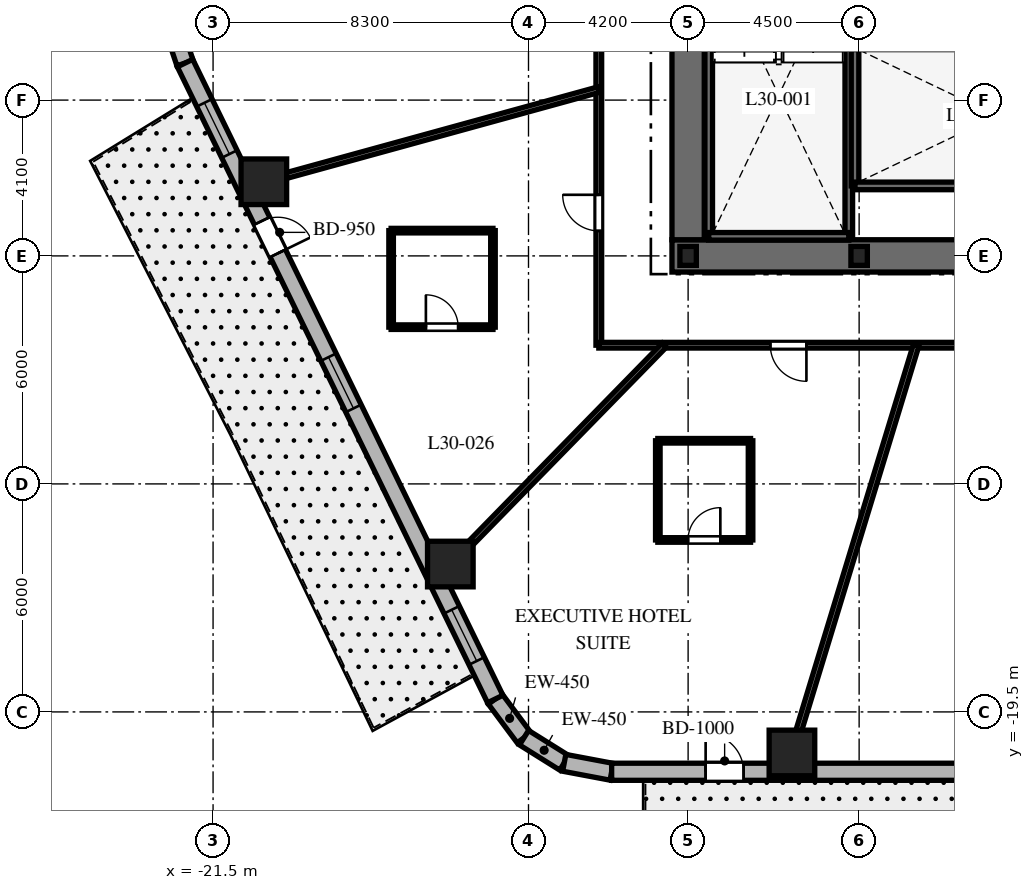
"""IFC4 building model, lengths in metres.
Left out: names, types, materials, properties, quantities, classifications, styles, units other than length and angle.
Written with IfcOpenShell. Run it as: python <this file> out.ifc"""

import sys

from ifc_helpers import new_model, si_unit, direction, frame, frame_2d, origin, origin_2d, place, context, subcontext, project, spatial, rectangle, i_section, extrude, element, fill, save


model = new_model("IFC4")
c1 = context("Model", 3, precision=1e-05, world=origin(), true_north=direction((0.0, 1.0)))
c2 = subcontext(c1, "Body", "Model", "MODEL_VIEW")
j1 = project(units=[si_unit("LENGTHUNIT", "METRE"), si_unit("PLANEANGLEUNIT", "RADIAN")], contexts=[c1])
p1 = place(None, origin())
s1 = spatial("IfcSite", under=j1, at=p1, CompositionType="ELEMENT")
p2 = place(p1, origin())
s2 = spatial("IfcBuilding", under=s1, at=p2, CompositionType="ELEMENT")
p3 = place(p2, frame((0.0, 0.0, 124.7)))
s3 = spatial("IfcBuildingStorey", under=s2, at=p3, CompositionType="ELEMENT", Elevation=124.7)
p4 = place(p3, frame((-9.425, -7.5, 0.0), z_axis=(0.0, 0.0, 1.0), x_axis=(1.0, 0.0, 0.0)))
e1 = element("IfcWall", 1, at=p4, inside=s3, PredefinedType="SHEAR", context=c2, shape_type="SweptSolid", body=[
    extrude(rectangle(XDim=18.85, YDim=0.85, at=frame_2d((9.425, 0.0))), origin(), (0.0, 0.0, 1.0), 3.7),
])
p5 = place(p4, frame((9.475, 0.0, 0.0)))
e2 = element("IfcOpeningElement", 2, at=p5, cuts=e1, PredefinedType="OPENING", context=c2, shape_type="SweptSolid", body=[
    extrude(rectangle(XDim=1.0, YDim=2.15, at=frame_2d((0.5, 1.075))), frame((0.0, 0.435, 0.0), z_axis=(0.0, -1.0, 0.0), x_axis=(1.0, 0.0, 0.0)), (0.0, 0.0, 1.0), 0.87),
])
p6 = place(p3, frame((-9.0, -7.075, 0.0), z_axis=(0.0, 0.0, 1.0), x_axis=(0.0, 1.0, 0.0)))
e3 = element("IfcWall", 3, at=p6, inside=s3, PredefinedType="SHEAR", context=c2, shape_type="SweptSolid", body=[
    extrude(rectangle(XDim=14.15, YDim=0.85, at=frame_2d((7.075, 0.0))), origin(), (0.0, 0.0, 1.0), 3.7),
])
p7 = place(p6, frame((10.2, 0.0, 0.0)))
e4 = element("IfcOpeningElement", 4, at=p7, cuts=e3, PredefinedType="OPENING", context=c2, shape_type="SweptSolid", body=[
    extrude(rectangle(XDim=1.05, YDim=2.15, at=frame_2d((0.525, 1.075))), frame((0.0, 0.435, 0.0), z_axis=(0.0, -1.0, 0.0), x_axis=(1.0, 0.0, 0.0)), (0.0, 0.0, 1.0), 0.87),
])
for number, where, z_axis, x_axis in (
    (5, (-8.458, -6.985, 0.0), (0.0, 0.0, 1.0), (0.0, 1.0, 0.0)),
    (6, (-4.772, -6.985, 0.0), (0.0, 0.0, 1.0), (0.0, 1.0, 0.0)),
):
    element("IfcWall", number, at=place(p3, frame(where, z_axis=z_axis, x_axis=x_axis)), inside=s3, PredefinedType="SHEAR", context=c2, shape_type="SweptSolid", body=[
        extrude(rectangle(XDim=9.143, YDim=0.2, at=frame_2d((4.572, 0.0))), origin(), (0.0, 0.0, 1.0), 3.7),
    ])
for number, where, z_axis, x_axis in (
    (7, (-8.458, -6.985, 0.0), (0.0, 0.0, 1.0), (1.0, 0.0, 0.0)),
    (8, (-4.608, -5.658, 0.0), (0.0, 0.0, 1.0), (0.0, 1.0, 0.0)),
):
    element("IfcWall", number, at=place(p3, frame(where, z_axis=z_axis, x_axis=x_axis)), inside=s3, PredefinedType="SHEAR", context=c2, shape_type="SweptSolid", body=[
        extrude(rectangle(XDim=3.686, YDim=0.2, at=frame_2d((1.843, 0.0))), origin(), (0.0, 0.0, 1.0), 3.7),
    ])
p8 = place(p3, frame((-4.608, -5.658, 0.0), z_axis=(0.0, 0.0, 1.0), x_axis=(1.0, 0.0, 0.0)))
e9 = element("IfcWall", 9, at=p8, inside=s3, PredefinedType="SHEAR", context=c2, shape_type="SweptSolid", body=[
    extrude(rectangle(XDim=9.166, YDim=0.2, at=frame_2d((4.583, 0.0))), origin(), (0.0, 0.0, 1.0), 3.7),
])
p9 = place(p8, frame((7.45, 0.0, 0.0)))
e10 = element("IfcOpeningElement", 10, at=p9, cuts=e9, PredefinedType="OPENING", context=c2, shape_type="SweptSolid", body=[
    extrude(rectangle(XDim=1.0, YDim=2.15, at=frame_2d((0.5, 1.075))), frame((0.0, 0.11, 0.0), z_axis=(0.0, -1.0, 0.0), x_axis=(1.0, 0.0, 0.0)), (0.0, 0.0, 1.0), 0.22),
])
for number, where, z_axis, x_axis in (
    (11, (-9.0, -7.5, 0.0), (0.0, 0.0, 1.0), (1.0, 0.0, 0.0)),
    (12, (-4.5, -7.5, 0.0), (0.0, 0.0, 1.0), (1.0, 0.0, 0.0)),
):
    element("IfcColumn", number, at=place(p3, frame(where, z_axis=z_axis, x_axis=x_axis)), inside=s3, PredefinedType="COLUMN", context=c2, shape_type="SweptSolid", body=[
        extrude(i_section(OverallWidth=0.432, OverallDepth=0.498, WebThickness=0.056, FlangeThickness=0.089, at=origin_2d()), origin(), (0.0, 0.0, 1.0), 3.7),
    ])
for number, where, z_axis, x_axis in (
    (13, (-6.268, -20.58, 0.0), (0.0, 0.0, 1.0), (1.0, 0.0, 0.0)),
    (14, (-20.164, -5.549, 0.0), (0.0, 0.0, 1.0), (1.0, 0.0, 0.0)),
    (15, (-15.257, -15.609, 0.0), (0.0, 0.0, 1.0), (1.0, 0.0, 0.0)),
):
    element("IfcColumn", number, at=place(p3, frame(where, z_axis=z_axis, x_axis=x_axis)), inside=s3, PredefinedType="COLUMN", context=c2, shape_type="SweptSolid", body=[
        extrude(rectangle(XDim=1.2, YDim=1.2, at=origin_2d()), origin(), (0.0, 0.0, 1.0), 3.7),
    ])
p10 = place(p3, frame((-14.076, -19.161, 0.0), z_axis=(0.0, 0.0, 1.0), x_axis=(0.597226657159, -0.802072515412, 0.0)))
e16 = element("IfcWall", 16, at=p10, inside=s3, PredefinedType="SOLIDWALL", context=c2, shape_type="SweptSolid", body=[
    extrude(rectangle(XDim=1.269, YDim=0.45, at=frame_2d((0.635, 0.0))), origin(), (0.0, 0.0, 1.0), 3.4),
])
p11 = place(p3, frame((-13.318, -20.179, 0.0), z_axis=(0.0, 0.0, 1.0), x_axis=(0.848031272749, -0.529946186362, 0.0)))
e17 = element("IfcWall", 17, at=p11, inside=s3, PredefinedType="SOLIDWALL", context=c2, shape_type="SweptSolid", body=[
    extrude(rectangle(XDim=1.248, YDim=0.45, at=frame_2d((0.624, 0.0))), origin(), (0.0, 0.0, 1.0), 3.4),
])
p12 = place(p3, frame((-12.259, -20.84, 0.0), z_axis=(0.0, 0.0, 1.0), x_axis=(0.982730354425, -0.185043374624, 0.0)))
e18 = element("IfcWall", 18, at=p12, inside=s3, PredefinedType="SOLIDWALL", context=c2, shape_type="SweptSolid", body=[
    extrude(rectangle(XDim=1.269, YDim=0.45, at=frame_2d((0.635, 0.0))), origin(), (0.0, 0.0, 1.0), 3.4),
])
p13 = place(p3, frame((-22.522, -1.577, 0.0), z_axis=(0.0, 0.0, 1.0), x_axis=(0.317372694837, -0.948300887151, 0.0)))
e19 = element("IfcWall", 19, at=p13, inside=s3, PredefinedType="SOLIDWALL", context=c2, shape_type="SweptSolid", body=[
    extrude(rectangle(XDim=0.896, YDim=0.45, at=frame_2d((0.448, 0.0))), origin(), (0.0, 0.0, 1.0), 3.4),
])
p14 = place(p3, frame((-11.012, -21.075, 0.0), z_axis=(0.0, 0.0, 1.0), x_axis=(1.0, 0.0, 0.0)))
e20 = element("IfcWall", 20, at=p14, inside=s3, PredefinedType="SOLIDWALL", context=c2, shape_type="SweptSolid", body=[
    extrude(rectangle(XDim=23.782, YDim=0.45, at=frame_2d((11.891, 0.0))), origin(), (0.0, 0.0, 1.0), 3.4),
])
p15 = place(p14, frame((2.473, 0.0, 0.0)))
e21 = element("IfcOpeningElement", 21, at=p15, cuts=e20, PredefinedType="OPENING", context=c2, shape_type="SweptSolid", body=[
    extrude(rectangle(XDim=1.0, YDim=2.15, at=frame_2d((0.5, 1.075))), frame((0.0, 0.235, 0.0), z_axis=(0.0, -1.0, 0.0), x_axis=(1.0, 0.0, 0.0)), (0.0, 0.0, 1.0), 0.47),
])
p16 = place(p14, frame((11.142, 0.0, 0.8)))
e22 = element("IfcOpeningElement", 22, at=p16, cuts=e20, PredefinedType="OPENING", context=c2, shape_type="SweptSolid", body=[
    extrude(rectangle(XDim=1.5, YDim=1.8, at=frame_2d((0.75, 0.9))), frame((0.0, 0.235, 0.0), z_axis=(0.0, -1.0, 0.0), x_axis=(1.0, 0.0, 0.0)), (0.0, 0.0, 1.0), 0.47),
])
p17 = place(p14, frame((20.741, 0.0, 0.8)))
e23 = element("IfcOpeningElement", 23, at=p17, cuts=e20, PredefinedType="OPENING", context=c2, shape_type="SweptSolid", body=[
    extrude(rectangle(XDim=1.5, YDim=1.8, at=frame_2d((0.75, 0.9))), frame((0.0, 0.235, 0.0), z_axis=(0.0, -1.0, 0.0), x_axis=(1.0, 0.0, 0.0)), (0.0, 0.0, 1.0), 0.47),
])
p18 = place(p3, frame((-22.238, -2.427, 0.0), z_axis=(0.0, 0.0, 1.0), x_axis=(0.438374803278, -0.898792262901, 0.0)))
e24 = element("IfcWall", 24, at=p18, inside=s3, PredefinedType="SOLIDWALL", context=c2, shape_type="SweptSolid", body=[
    extrude(rectangle(XDim=18.618, YDim=0.45, at=frame_2d((9.309, 0.0))), origin(), (0.0, 0.0, 1.0), 3.4),
])
p19 = place(p18, frame((4.62, 0.0, 0.0)))
e25 = element("IfcOpeningElement", 25, at=p19, cuts=e24, PredefinedType="OPENING", context=c2, shape_type="SweptSolid", body=[
    extrude(rectangle(XDim=0.95, YDim=2.15, at=frame_2d((0.475, 1.075))), frame((0.0, 0.235, 0.0), z_axis=(0.0, -1.0, 0.0), x_axis=(1.0, 0.0, 0.0)), (0.0, 0.0, 1.0), 0.47),
])
p20 = place(p18, frame((1.163, 0.0, 0.8)))
e26 = element("IfcOpeningElement", 26, at=p20, cuts=e24, PredefinedType="OPENING", context=c2, shape_type="SweptSolid", body=[
    extrude(rectangle(XDim=1.5, YDim=1.8, at=frame_2d((0.75, 0.9))), frame((0.0, 0.235, 0.0), z_axis=(0.0, -1.0, 0.0), x_axis=(1.0, 0.0, 0.0)), (0.0, 0.0, 1.0), 0.47),
])
p21 = place(p18, frame((8.61, 0.0, 0.8)))
e27 = element("IfcOpeningElement", 27, at=p21, cuts=e24, PredefinedType="OPENING", context=c2, shape_type="SweptSolid", body=[
    extrude(rectangle(XDim=1.5, YDim=1.8, at=frame_2d((0.75, 0.9))), frame((0.0, 0.235, 0.0), z_axis=(0.0, -1.0, 0.0), x_axis=(1.0, 0.0, 0.0)), (0.0, 0.0, 1.0), 0.47),
])
p22 = place(p18, frame((16.006, 0.0, 0.8)))
e28 = element("IfcOpeningElement", 28, at=p22, cuts=e24, PredefinedType="OPENING", context=c2, shape_type="SweptSolid", body=[
    extrude(rectangle(XDim=1.5, YDim=1.8, at=frame_2d((0.75, 0.9))), frame((0.0, 0.235, 0.0), z_axis=(0.0, -1.0, 0.0), x_axis=(1.0, 0.0, 0.0)), (0.0, 0.0, 1.0), 0.47),
])
p23 = place(p3, frame((-11.35, -9.85, 0.0), z_axis=(0.0, 0.0, 1.0), x_axis=(0.0, 1.0, 0.0)))
e29 = element("IfcWall", 29, at=p23, inside=s3, PredefinedType="PARTITIONING", context=c2, shape_type="SweptSolid", body=[
    extrude(rectangle(XDim=19.7, YDim=0.15, at=frame_2d((9.85, 0.0))), origin(), (0.0, 0.0, 1.0), 2.84),
])
p24 = place(p23, frame((15.205, 0.0, 0.0)))
e30 = element("IfcOpeningElement", 30, at=p24, cuts=e29, PredefinedType="OPENING", context=c2, shape_type="SweptSolid", body=[
    extrude(rectangle(XDim=0.95, YDim=2.03, at=frame_2d((0.475, 1.015))), frame((0.0, 0.085, 0.0), z_axis=(0.0, -1.0, 0.0), x_axis=(1.0, 0.0, 0.0)), (0.0, 0.0, 1.0), 0.17),
])
p25 = place(p23, frame((8.836, 0.0, 0.0)))
e31 = element("IfcOpeningElement", 31, at=p25, cuts=e29, PredefinedType="OPENING", context=c2, shape_type="SweptSolid", body=[
    extrude(rectangle(XDim=0.95, YDim=2.03, at=frame_2d((0.475, 1.015))), frame((0.0, 0.085, 0.0), z_axis=(0.0, -1.0, 0.0), x_axis=(1.0, 0.0, 0.0)), (0.0, 0.0, 1.0), 0.17),
])
p26 = place(p23, frame((3.008, 0.0, 0.0)))
e32 = element("IfcOpeningElement", 32, at=p26, cuts=e29, PredefinedType="OPENING", context=c2, shape_type="SweptSolid", body=[
    extrude(rectangle(XDim=0.95, YDim=2.03, at=frame_2d((0.475, 1.015))), frame((0.0, 0.085, 0.0), z_axis=(0.0, -1.0, 0.0), x_axis=(1.0, 0.0, 0.0)), (0.0, 0.0, 1.0), 0.17),
])
p27 = place(p3, frame((11.35, -9.85, 0.0), z_axis=(0.0, 0.0, 1.0), x_axis=(-1.0, 0.0, 0.0)))
e33 = element("IfcWall", 33, at=p27, inside=s3, PredefinedType="PARTITIONING", context=c2, shape_type="SweptSolid", body=[
    extrude(rectangle(XDim=22.7, YDim=0.15, at=frame_2d((11.35, 0.0))), origin(), (0.0, 0.0, 1.0), 2.84),
])
p28 = place(p27, frame((17.237, 0.0, 0.0)))
e34 = element("IfcOpeningElement", 34, at=p28, cuts=e33, PredefinedType="OPENING", context=c2, shape_type="SweptSolid", body=[
    extrude(rectangle(XDim=0.95, YDim=2.03, at=frame_2d((0.475, 1.015))), frame((0.0, 0.085, 0.0), z_axis=(0.0, -1.0, 0.0), x_axis=(1.0, 0.0, 0.0)), (0.0, 0.0, 1.0), 0.17),
])
p29 = place(p27, frame((10.45, 0.0, 0.0)))
e35 = element("IfcOpeningElement", 35, at=p29, cuts=e33, PredefinedType="OPENING", context=c2, shape_type="SweptSolid", body=[
    extrude(rectangle(XDim=0.95, YDim=2.03, at=frame_2d((0.475, 1.015))), frame((0.0, 0.085, 0.0), z_axis=(0.0, -1.0, 0.0), x_axis=(1.0, 0.0, 0.0)), (0.0, 0.0, 1.0), 0.17),
])
p30 = place(p27, frame((3.399, 0.0, 0.0)))
e36 = element("IfcOpeningElement", 36, at=p30, cuts=e33, PredefinedType="OPENING", context=c2, shape_type="SweptSolid", body=[
    extrude(rectangle(XDim=0.95, YDim=2.03, at=frame_2d((0.475, 1.015))), frame((0.0, 0.085, 0.0), z_axis=(0.0, -1.0, 0.0), x_axis=(1.0, 0.0, 0.0)), (0.0, 0.0, 1.0), 0.17),
])
p31 = place(p3, frame((-11.35, -3.123, 0.0), z_axis=(0.0, 0.0, 1.0), x_axis=(-0.964151983214, -0.265350623261, 0.0)))
e37 = element("IfcWall", 37, at=p31, inside=s3, PredefinedType="PARTITIONING", context=c2, shape_type="SweptSolid", body=[
    extrude(rectangle(XDim=9.645, YDim=0.15, at=frame_2d((4.823, 0.0))), origin(), (0.0, 0.0, 1.0), 2.54),
])
p32 = place(p3, frame((-9.628, -9.85, 0.0), z_axis=(0.0, 0.0, 1.0), x_axis=(-0.698992824326, -0.715128681805, 0.0)))
e38 = element("IfcWall", 38, at=p32, inside=s3, PredefinedType="PARTITIONING", context=c2, shape_type="SweptSolid", body=[
    extrude(rectangle(XDim=8.579, YDim=0.15, at=frame_2d((4.29, 0.0))), origin(), (0.0, 0.0, 1.0), 2.54),
])
p33 = place(p3, frame((-3.0, -9.85, 0.0), z_axis=(0.0, 0.0, 1.0), x_axis=(-0.291352035382, -0.95661590593, 0.0)))
e39 = element("IfcWall", 39, at=p33, inside=s3, PredefinedType="PARTITIONING", context=c2, shape_type="SweptSolid", body=[
    extrude(rectangle(XDim=11.734, YDim=0.15, at=frame_2d((5.867, 0.0))), origin(), (0.0, 0.0, 1.0), 2.54),
])
p34 = place(p3, frame((-16.815, -9.375, 0.0), z_axis=(0.0, 0.0, 1.0), x_axis=(1.0, 0.0, 0.0)))
e40 = element("IfcWall", 40, at=p34, inside=s3, PredefinedType="PARTITIONING", context=c2, shape_type="SweptSolid", body=[
    extrude(rectangle(XDim=2.68, YDim=0.12, at=frame_2d((1.34, 0.0))), origin(), (0.0, 0.0, 1.0), 2.927),
])
p35 = place(p34, frame((0.915, 0.0, 0.0)))
e41 = element("IfcOpeningElement", 41, at=p35, cuts=e40, PredefinedType="OPENING", context=c2, shape_type="SweptSolid", body=[
    extrude(rectangle(XDim=0.85, YDim=2.03, at=frame_2d((0.425, 1.015))), frame((0.0, 0.07, 0.0), z_axis=(0.0, -1.0, 0.0), x_axis=(1.0, 0.0, 0.0)), (0.0, 0.0, 1.0), 0.14),
])
p36 = place(p3, frame((-14.135, -9.375, 0.0), z_axis=(0.0, 0.0, 1.0), x_axis=(0.0, 1.0, 0.0)))
e42 = element("IfcWall", 42, at=p36, inside=s3, PredefinedType="PARTITIONING", context=c2, shape_type="SweptSolid", body=[
    extrude(rectangle(XDim=2.54, YDim=0.12, at=frame_2d((1.27, 0.0))), origin(), (0.0, 0.0, 1.0), 3.4),
])
p37 = place(p3, frame((-14.135, -6.835, 0.0), z_axis=(0.0, 0.0, 1.0), x_axis=(-1.0, 0.0, 0.0)))
e43 = element("IfcWall", 43, at=p37, inside=s3, PredefinedType="PARTITIONING", context=c2, shape_type="SweptSolid", body=[
    extrude(rectangle(XDim=2.68, YDim=0.12, at=frame_2d((1.34, 0.0))), origin(), (0.0, 0.0, 1.0), 2.927),
])
p38 = place(p3, frame((-16.815, -6.835, 0.0), z_axis=(0.0, 0.0, 1.0), x_axis=(0.0, -1.0, 0.0)))
e44 = element("IfcWall", 44, at=p38, inside=s3, PredefinedType="PARTITIONING", context=c2, shape_type="SweptSolid", body=[
    extrude(rectangle(XDim=2.54, YDim=0.12, at=frame_2d((1.27, 0.0))), origin(), (0.0, 0.0, 1.0), 3.4),
])
p39 = place(p3, frame((-9.797, -14.975, 0.0), z_axis=(0.0, 0.0, 1.0), x_axis=(1.0, 0.0, 0.0)))
e45 = element("IfcWall", 45, at=p39, inside=s3, PredefinedType="PARTITIONING", context=c2, shape_type="SweptSolid", body=[
    extrude(rectangle(XDim=2.44, YDim=0.12, at=frame_2d((1.22, 0.0))), origin(), (0.0, 0.0, 1.0), 2.972),
])
p40 = place(p39, frame((0.795, 0.0, 0.0)))
e46 = element("IfcOpeningElement", 46, at=p40, cuts=e45, PredefinedType="OPENING", context=c2, shape_type="SweptSolid", body=[
    extrude(rectangle(XDim=0.85, YDim=2.03, at=frame_2d((0.425, 1.015))), frame((0.0, 0.07, 0.0), z_axis=(0.0, -1.0, 0.0), x_axis=(1.0, 0.0, 0.0)), (0.0, 0.0, 1.0), 0.14),
])
p41 = place(p3, frame((-7.357, -14.975, 0.0), z_axis=(0.0, 0.0, 1.0), x_axis=(0.0, 1.0, 0.0)))
e47 = element("IfcWall", 47, at=p41, inside=s3, PredefinedType="PARTITIONING", context=c2, shape_type="SweptSolid", body=[
    extrude(rectangle(XDim=2.61, YDim=0.12, at=frame_2d((1.305, 0.0))), origin(), (0.0, 0.0, 1.0), 2.84),
])
p42 = place(p3, frame((-7.357, -12.365, 0.0), z_axis=(0.0, 0.0, 1.0), x_axis=(-1.0, 0.0, 0.0)))
e48 = element("IfcWall", 48, at=p42, inside=s3, PredefinedType="PARTITIONING", context=c2, shape_type="SweptSolid", body=[
    extrude(rectangle(XDim=2.44, YDim=0.12, at=frame_2d((1.22, 0.0))), origin(), (0.0, 0.0, 1.0), 2.84),
])
p43 = place(p3, frame((-9.797, -12.365, 0.0), z_axis=(0.0, 0.0, 1.0), x_axis=(0.0, -1.0, 0.0)))
e49 = element("IfcWall", 49, at=p43, inside=s3, PredefinedType="PARTITIONING", context=c2, shape_type="SweptSolid", body=[
    extrude(rectangle(XDim=2.61, YDim=0.12, at=frame_2d((1.305, 0.0))), origin(), (0.0, 0.0, 1.0), 2.972),
])
p44 = place(p15, origin())
e50 = element("IfcDoor", 50, at=p44, inside=s3, OperationType="SINGLE_SWING_LEFT", PredefinedType="DOOR", context=c2, shape_type="SweptSolid", body=[
    extrude(rectangle(XDim=1.0, YDim=2.15, at=frame_2d((0.5, 1.075))), frame((0.0, 0.025, 0.0), z_axis=(0.0, -1.0, 0.0), x_axis=(1.0, 0.0, 0.0)), (0.0, 0.0, 1.0), 0.05),
])
fill(e21, e50)
p45 = place(p19, origin())
e51 = element("IfcDoor", 51, at=p45, inside=s3, OperationType="SINGLE_SWING_RIGHT", PredefinedType="DOOR", context=c2, shape_type="SweptSolid", body=[
    extrude(rectangle(XDim=0.95, YDim=2.15, at=frame_2d((0.475, 1.075))), frame((0.0, 0.025, 0.0), z_axis=(0.0, -1.0, 0.0), x_axis=(1.0, 0.0, 0.0)), (0.0, 0.0, 1.0), 0.05),
])
fill(e25, e51)
p46 = place(p20, origin())
e52 = element("IfcWindow", 52, at=p46, inside=s3, PartitioningType="SINGLE_PANEL", PredefinedType="WINDOW", context=c2, shape_type="SweptSolid", body=[
    extrude(rectangle(XDim=1.5, YDim=1.8, at=frame_2d((0.75, 0.9))), frame((0.0, 0.03, 0.0), z_axis=(0.0, -1.0, 0.0), x_axis=(1.0, 0.0, 0.0)), (0.0, 0.0, 1.0), 0.06),
])
fill(e26, e52)
p47 = place(p21, origin())
e53 = element("IfcWindow", 53, at=p47, inside=s3, PartitioningType="SINGLE_PANEL", PredefinedType="WINDOW", context=c2, shape_type="SweptSolid", body=[
    extrude(rectangle(XDim=1.5, YDim=1.8, at=frame_2d((0.75, 0.9))), frame((0.0, 0.03, 0.0), z_axis=(0.0, -1.0, 0.0), x_axis=(1.0, 0.0, 0.0)), (0.0, 0.0, 1.0), 0.06),
])
fill(e27, e53)
p48 = place(p22, origin())
e54 = element("IfcWindow", 54, at=p48, inside=s3, PartitioningType="SINGLE_PANEL", PredefinedType="WINDOW", context=c2, shape_type="SweptSolid", body=[
    extrude(rectangle(XDim=1.5, YDim=1.8, at=frame_2d((0.75, 0.9))), frame((0.0, 0.03, 0.0), z_axis=(0.0, -1.0, 0.0), x_axis=(1.0, 0.0, 0.0)), (0.0, 0.0, 1.0), 0.06),
])
fill(e28, e54)
p49 = place(p26, origin())
e55 = element("IfcDoor", 55, at=p49, inside=s3, OperationType="SINGLE_SWING_RIGHT", PredefinedType="DOOR", context=c2, shape_type="SweptSolid", body=[
    extrude(rectangle(XDim=0.95, YDim=2.03, at=frame_2d((0.475, 1.015))), frame((0.0, 0.025, 0.0), z_axis=(0.0, -1.0, 0.0), x_axis=(1.0, 0.0, 0.0)), (0.0, 0.0, 1.0), 0.05),
])
fill(e32, e55)
p50 = place(p35, origin())
e56 = element("IfcDoor", 56, at=p50, inside=s3, OperationType="SINGLE_SWING_LEFT", PredefinedType="DOOR", context=c2, shape_type="SweptSolid", body=[
    extrude(rectangle(XDim=0.85, YDim=2.03, at=frame_2d((0.425, 1.015))), frame((0.0, 0.025, 0.0), z_axis=(0.0, -1.0, 0.0), x_axis=(1.0, 0.0, 0.0)), (0.0, 0.0, 1.0), 0.05),
])
fill(e41, e56)
p51 = place(p28, origin())
e57 = element("IfcDoor", 57, at=p51, inside=s3, OperationType="SINGLE_SWING_LEFT", PredefinedType="DOOR", context=c2, shape_type="SweptSolid", body=[
    extrude(rectangle(XDim=0.95, YDim=2.03, at=frame_2d((0.475, 1.015))), frame((0.0, 0.025, 0.0), z_axis=(0.0, -1.0, 0.0), x_axis=(1.0, 0.0, 0.0)), (0.0, 0.0, 1.0), 0.05),
])
fill(e34, e57)
p52 = place(p40, origin())
e58 = element("IfcDoor", 58, at=p52, inside=s3, OperationType="SINGLE_SWING_RIGHT", PredefinedType="DOOR", context=c2, shape_type="SweptSolid", body=[
    extrude(rectangle(XDim=0.85, YDim=2.03, at=frame_2d((0.425, 1.015))), frame((0.0, 0.025, 0.0), z_axis=(0.0, -1.0, 0.0), x_axis=(1.0, 0.0, 0.0)), (0.0, 0.0, 1.0), 0.05),
])
fill(e46, e58)
save(model, sys.argv[1])
